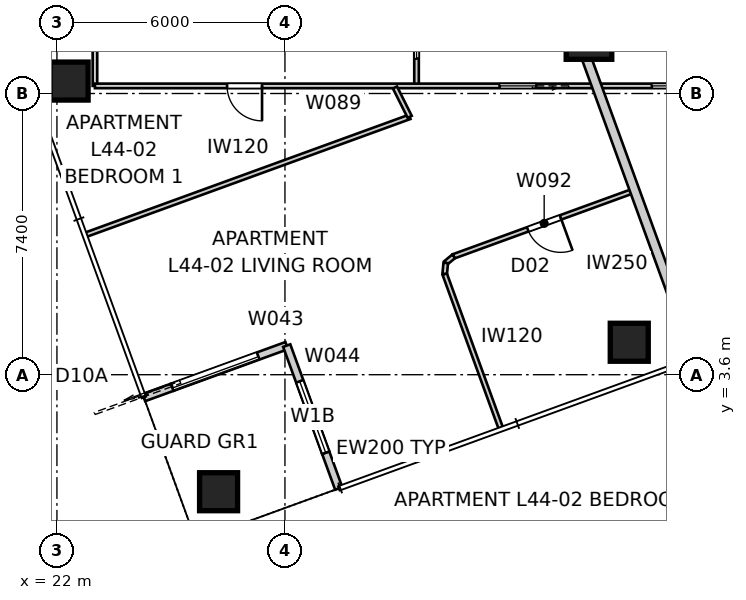
"""IFC4 building model, lengths in metres.
Left out: names, types, materials, properties, quantities, classifications, styles, units other than length and angle.
Written with IfcOpenShell. Run it as: python <this file> out.ifc"""

import sys

from ifc_helpers import new_model, si_unit, direction, frame, frame_2d, origin, origin_2d, place, context, subcontext, project, spatial, rectangle, extrude, element, fill, save


model = new_model("IFC4")
c1 = context("Model", 3, precision=1e-05, world=origin(), true_north=direction((0.0, 1.0)))
c2 = subcontext(c1, "Body", "Model", "MODEL_VIEW")
j1 = project(units=[si_unit("LENGTHUNIT", "METRE"), si_unit("PLANEANGLEUNIT", "RADIAN")], contexts=[c1])
p1 = place(None, origin())
s1 = spatial("IfcSite", under=j1, at=p1, CompositionType="ELEMENT")
p2 = place(p1, origin())
s2 = spatial("IfcBuilding", under=s1, at=p2, CompositionType="ELEMENT")
p3 = place(p2, frame((0.0, 0.0, 160.8)))
s3 = spatial("IfcBuildingStorey", under=s2, at=p3, CompositionType="ELEMENT", Elevation=160.8)
for number, where, z_axis, x_axis in (
    (1, (26.253, 0.521, 0.0), (0.0, 0.0, 1.0), (1.0, 0.0, 0.0)),
    (2, (37.06, 4.454, 0.0), (0.0, 0.0, 1.0), (1.0, 0.0, 0.0)),
    (3, (22.32, 11.327, 0.0), (0.0, 0.0, 1.0), (1.0, 0.0, 0.0)),
):
    element("IfcColumn", number, at=place(p3, frame(where, z_axis=z_axis, x_axis=x_axis)), inside=s3, PredefinedType="COLUMN", context=c2, shape_type="SweptSolid", body=[
        extrude(rectangle(XDim=1.0, YDim=1.0, at=origin_2d()), origin(), (0.0, 0.0, 1.0), 3.4),
    ])
p4 = place(p3, frame((36.0, 12.5, 0.0), z_axis=(0.0, 0.0, 1.0), x_axis=(1.0, 0.0, 0.0)))
e4 = element("IfcColumn", 4, at=p4, inside=s3, PredefinedType="COLUMN", context=c2, shape_type="SweptSolid", body=[
    extrude(rectangle(XDim=1.2, YDim=1.2, at=origin_2d()), origin(), (0.0, 0.0, 1.0), 3.4),
])
p5 = place(p3, frame((24.288, 2.998, 0.0), z_axis=(0.0, 0.0, 1.0), x_axis=(0.939659694648, 0.342110593602, 0.0)))
e5 = element("IfcWall", 5, at=p5, inside=s3, PredefinedType="SOLIDWALL", context=c2, shape_type="SweptSolid", body=[
    extrude(rectangle(XDim=0.8, YDim=0.2, at=frame_2d((0.4, 0.0))), origin(), (0.0, 0.0, 1.0), 3.25),
])
p6 = place(p3, frame((25.04, 3.271, 0.0), z_axis=(0.0, 0.0, 1.0), x_axis=(0.939693144909, 0.342018703306, 0.0)))
e6 = element("IfcWall", 6, at=p6, inside=s3, PredefinedType="SOLIDWALL", context=c2, shape_type="SweptSolid", body=[
    extrude(rectangle(XDim=3.2, YDim=0.2, at=frame_2d((1.6, 0.0))), origin(), (0.0, 0.0, 1.0), 2.722),
])
p7 = place(p6, origin())
e7 = element("IfcOpeningElement", 7, at=p7, cuts=e6, PredefinedType="OPENING", context=c2, shape_type="SweptSolid", body=[
    extrude(rectangle(XDim=2.4, YDim=2.1, at=frame_2d((1.2, 1.05))), frame((0.0, 0.11, 0.0), z_axis=(0.0, -1.0, 0.0), x_axis=(1.0, 0.0, 0.0)), (0.0, 0.0, 1.0), 0.22),
])
p8 = place(p3, frame((28.047, 4.366, 0.0), z_axis=(0.0, 0.0, 1.0), x_axis=(0.341965219194, -0.939712609717, 0.0)))
e8 = element("IfcWall", 8, at=p8, inside=s3, PredefinedType="SOLIDWALL", context=c2, shape_type="SweptSolid", body=[
    extrude(rectangle(XDim=3.0, YDim=0.2, at=frame_2d((1.5, 0.0))), origin(), (0.0, 0.0, 1.0), 2.722),
])
p9 = place(p8, frame((1.0, 0.0, 0.45)))
e9 = element("IfcOpeningElement", 9, at=p9, cuts=e8, PredefinedType="OPENING", context=c2, shape_type="SweptSolid", body=[
    extrude(rectangle(XDim=2.0, YDim=1.8, at=frame_2d((1.0, 0.9))), frame((0.0, 0.11, 0.0), z_axis=(0.0, -1.0, 0.0), x_axis=(1.0, 0.0, 0.0)), (0.0, 0.0, 1.0), 0.22),
])
p10 = place(p3, frame((29.073, 1.547, 0.0), z_axis=(0.0, 0.0, 1.0), x_axis=(0.342037080957, -0.939686455819, 0.0)))
e10 = element("IfcWall", 10, at=p10, inside=s3, PredefinedType="SOLIDWALL", context=c2, shape_type="SweptSolid", body=[
    extrude(rectangle(XDim=1.0, YDim=0.2, at=frame_2d((0.5, 0.0))), origin(), (0.0, 0.0, 1.0), 3.25),
])
p11 = place(p3, frame((38.812, 4.027, 0.0), z_axis=(0.0, 0.0, 1.0), x_axis=(-0.342027987857, 0.939689765573, 0.0)))
e11 = element("IfcWall", 11, at=p11, inside=s3, PredefinedType="PARTITIONING", context=c2, shape_type="SweptSolid", body=[
    extrude(rectangle(XDim=10.182, YDim=0.25, at=frame_2d((5.091, 0.0))), origin(), (0.0, 0.0, 1.0), 3.25),
])
p12 = place(p3, frame((23.0, 11.2, 0.0), z_axis=(0.0, 0.0, 1.0), x_axis=(0.0, 1.0, 0.0)))
e12 = element("IfcWall", 12, at=p12, inside=s3, PredefinedType="PARTITIONING", context=c2, shape_type="SweptSolid", body=[
    extrude(rectangle(XDim=8.1, YDim=0.12, at=frame_2d((4.05, 0.0))), origin(), (0.0, 0.0, 1.0), 3.25),
])
p13 = place(p12, frame((3.849, 0.0, 0.0)))
e13 = element("IfcOpeningElement", 13, at=p13, cuts=e12, PredefinedType="OPENING", context=c2, shape_type="SweptSolid", body=[
    extrude(rectangle(XDim=0.96, YDim=2.1, at=frame_2d((0.48, 1.05))), frame((0.0, 0.07, 0.0), z_axis=(0.0, -1.0, 0.0), x_axis=(1.0, 0.0, 0.0)), (0.0, 0.0, 1.0), 0.14),
])
p14 = place(p3, frame((31.462, 13.6, 0.0), z_axis=(0.0, 0.0, 1.0), x_axis=(0.0, -1.0, 0.0)))
e14 = element("IfcWall", 14, at=p14, inside=s3, PredefinedType="PARTITIONING", context=c2, shape_type="SweptSolid", body=[
    extrude(rectangle(XDim=2.4, YDim=0.12, at=frame_2d((1.2, 0.0))), origin(), (0.0, 0.0, 1.0), 3.25),
])
p15 = place(p14, frame((0.72, 0.0, 0.0)))
e15 = element("IfcOpeningElement", 15, at=p15, cuts=e14, PredefinedType="OPENING", context=c2, shape_type="SweptSolid", body=[
    extrude(rectangle(XDim=0.96, YDim=2.1, at=frame_2d((0.48, 1.05))), frame((0.0, 0.07, 0.0), z_axis=(0.0, -1.0, 0.0), x_axis=(1.0, 0.0, 0.0)), (0.0, 0.0, 1.0), 0.14),
])
p16 = place(p3, frame((43.098, 11.2, 0.0), z_axis=(0.0, 0.0, 1.0), x_axis=(-1.0, 0.0, 0.0)))
e16 = element("IfcWall", 16, at=p16, inside=s3, PredefinedType="PARTITIONING", context=c2, shape_type="SweptSolid", body=[
    extrude(rectangle(XDim=20.098, YDim=0.12, at=frame_2d((10.049, 0.0))), origin(), (0.0, 0.0, 1.0), 3.25),
])
p17 = place(p16, frame((15.701, 0.0, 0.0)))
e17 = element("IfcOpeningElement", 17, at=p17, cuts=e16, PredefinedType="OPENING", context=c2, shape_type="SweptSolid", body=[
    extrude(rectangle(XDim=0.92, YDim=2.34, at=frame_2d((0.46, 1.17))), frame((0.0, 0.07, 0.0), z_axis=(0.0, -1.0, 0.0), x_axis=(1.0, 0.0, 0.0)), (0.0, 0.0, 1.0), 0.14),
])
p18 = place(p16, frame((8.49, 0.0, 0.0)))
e18 = element("IfcOpeningElement", 18, at=p18, cuts=e16, PredefinedType="OPENING", context=c2, shape_type="SweptSolid", body=[
    extrude(rectangle(XDim=0.96, YDim=2.1, at=frame_2d((0.48, 1.05))), frame((0.0, 0.07, 0.0), z_axis=(0.0, -1.0, 0.0), x_axis=(1.0, 0.0, 0.0)), (0.0, 0.0, 1.0), 0.14),
])
p19 = place(p16, frame((0.185, 0.0, 0.0)))
e19 = element("IfcOpeningElement", 19, at=p19, cuts=e16, PredefinedType="OPENING", context=c2, shape_type="SweptSolid", body=[
    extrude(rectangle(XDim=0.96, YDim=2.1, at=frame_2d((0.48, 1.05))), frame((0.0, 0.07, 0.0), z_axis=(0.0, -1.0, 0.0), x_axis=(1.0, 0.0, 0.0)), (0.0, 0.0, 1.0), 0.14),
])
p20 = place(p16, frame((4.484, 0.0, 0.0)))
e20 = element("IfcOpeningElement", 20, at=p20, cuts=e16, PredefinedType="OPENING", context=c2, shape_type="SweptSolid", body=[
    extrude(rectangle(XDim=0.96, YDim=2.1, at=frame_2d((0.48, 1.05))), frame((0.0, 0.07, 0.0), z_axis=(0.0, -1.0, 0.0), x_axis=(1.0, 0.0, 0.0)), (0.0, 0.0, 1.0), 0.14),
])
p21 = place(p3, frame((22.769, 7.287, 0.0), z_axis=(0.0, 0.0, 1.0), x_axis=(0.939692673089, 0.342019999623, 0.0)))
e21 = element("IfcWall", 21, at=p21, inside=s3, PredefinedType="PARTITIONING", context=c2, shape_type="SweptSolid", body=[
    extrude(rectangle(XDim=9.06, YDim=0.12, at=frame_2d((4.53, 0.0))), origin(), (0.0, 0.0, 1.0), 3.25),
])
p22 = place(p3, frame((31.283, 10.385, 0.0), z_axis=(0.0, 0.0, 1.0), x_axis=(-0.448117513314, 0.893974660861, 0.0)))
e22 = element("IfcWall", 22, at=p22, inside=s3, PredefinedType="PARTITIONING", context=c2, shape_type="SweptSolid", body=[
    extrude(rectangle(XDim=0.864, YDim=0.12, at=frame_2d((0.432, 0.0))), origin(), (0.0, 0.0, 1.0), 3.25),
])
p23 = place(p3, frame((37.202, 8.449, 0.0), z_axis=(0.0, 0.0, 1.0), x_axis=(-0.939692115443, -0.34202153174, 0.0)))
e23 = element("IfcWall", 23, at=p23, inside=s3, PredefinedType="PARTITIONING", context=c2, shape_type="SweptSolid", body=[
    extrude(rectangle(XDim=5.068, YDim=0.12, at=frame_2d((2.534, 0.0))), origin(), (0.0, 0.0, 1.0), 3.25),
])
p24 = place(p23, frame((2.074, 0.0, 0.0)))
e24 = element("IfcOpeningElement", 24, at=p24, cuts=e23, PredefinedType="OPENING", context=c2, shape_type="SweptSolid", body=[
    extrude(rectangle(XDim=0.92, YDim=2.34, at=frame_2d((0.46, 1.17))), frame((0.0, 0.07, 0.0), z_axis=(0.0, -1.0, 0.0), x_axis=(1.0, 0.0, 0.0)), (0.0, 0.0, 1.0), 0.14),
])
p25 = place(p3, frame((32.44, 6.715, 0.0), z_axis=(0.0, 0.0, 1.0), x_axis=(-0.769401529914, -0.638765438769, 0.0)))
e25 = element("IfcWall", 25, at=p25, inside=s3, PredefinedType="PARTITIONING", context=c2, shape_type="SweptSolid", body=[
    extrude(rectangle(XDim=0.271, YDim=0.12, at=frame_2d((0.135, 0.0))), origin(), (0.0, 0.0, 1.0), 3.25),
])
p26 = place(p3, frame((32.231, 6.542, 0.0), z_axis=(0.0, 0.0, 1.0), x_axis=(-0.093212941297, -0.995646195983, 0.0)))
e26 = element("IfcWall", 26, at=p26, inside=s3, PredefinedType="PARTITIONING", context=c2, shape_type="SweptSolid", body=[
    extrude(rectangle(XDim=0.296, YDim=0.12, at=frame_2d((0.148, 0.0))), origin(), (0.0, 0.0, 1.0), 3.25),
])
p27 = place(p3, frame((32.204, 6.248, 0.0), z_axis=(0.0, 0.0, 1.0), x_axis=(0.342011603146, -0.939695729113, 0.0)))
e27 = element("IfcWall", 27, at=p27, inside=s3, PredefinedType="PARTITIONING", context=c2, shape_type="SweptSolid", body=[
    extrude(rectangle(XDim=4.307, YDim=0.12, at=frame_2d((2.153, 0.0))), origin(), (0.0, 0.0, 1.0), 3.25),
])
p28 = place(p7, origin())
e28 = element("IfcDoor", 28, at=p28, inside=s3, OperationType="SLIDING_TO_LEFT", PredefinedType="DOOR", context=c2, shape_type="SweptSolid", body=[
    extrude(rectangle(XDim=2.4, YDim=2.1, at=frame_2d((1.2, 1.05))), frame((0.0, 0.025, 0.0), z_axis=(0.0, -1.0, 0.0), x_axis=(1.0, 0.0, 0.0)), (0.0, 0.0, 1.0), 0.05),
])
fill(e7, e28)
p29 = place(p9, origin())
e29 = element("IfcWindow", 29, at=p29, inside=s3, PartitioningType="SINGLE_PANEL", PredefinedType="WINDOW", context=c2, shape_type="SweptSolid", body=[
    extrude(rectangle(XDim=2.0, YDim=1.8, at=frame_2d((1.0, 0.9))), frame((0.0, 0.03, 0.0), z_axis=(0.0, -1.0, 0.0), x_axis=(1.0, 0.0, 0.0)), (0.0, 0.0, 1.0), 0.06),
])
fill(e9, e29)
p30 = place(p17, origin())
e30 = element("IfcDoor", 30, at=p30, inside=s3, OperationType="SINGLE_SWING_LEFT", PredefinedType="DOOR", context=c2, shape_type="SweptSolid", body=[
    extrude(rectangle(XDim=0.92, YDim=2.34, at=frame_2d((0.46, 1.17))), frame((0.0, 0.025, 0.0), z_axis=(0.0, -1.0, 0.0), x_axis=(1.0, 0.0, 0.0)), (0.0, 0.0, 1.0), 0.05),
])
fill(e17, e30)
p31 = place(p15, origin())
e31 = element("IfcDoor", 31, at=p31, inside=s3, OperationType="SLIDING_TO_LEFT", PredefinedType="DOOR", context=c2, shape_type="SweptSolid", body=[
    extrude(rectangle(XDim=0.96, YDim=2.1, at=frame_2d((0.48, 1.05))), frame((0.0, 0.025, 0.0), z_axis=(0.0, -1.0, 0.0), x_axis=(1.0, 0.0, 0.0)), (0.0, 0.0, 1.0), 0.05),
])
fill(e15, e31)
p32 = place(p18, origin())
e32 = element("IfcDoor", 32, at=p32, inside=s3, OperationType="SLIDING_TO_LEFT", PredefinedType="DOOR", context=c2, shape_type="SweptSolid", body=[
    extrude(rectangle(XDim=0.96, YDim=2.1, at=frame_2d((0.48, 1.05))), frame((0.0, 0.025, 0.0), z_axis=(0.0, -1.0, 0.0), x_axis=(1.0, 0.0, 0.0)), (0.0, 0.0, 1.0), 0.05),
])
fill(e18, e32)
p33 = place(p24, origin())
e33 = element("IfcDoor", 33, at=p33, inside=s3, OperationType="SINGLE_SWING_LEFT", PredefinedType="DOOR", context=c2, shape_type="SweptSolid", body=[
    extrude(rectangle(XDim=0.92, YDim=2.34, at=frame_2d((0.46, 1.17))), frame((0.0, 0.025, 0.0), z_axis=(0.0, -1.0, 0.0), x_axis=(1.0, 0.0, 0.0)), (0.0, 0.0, 1.0), 0.05),
])
fill(e24, e33)
p34 = place(p20, origin())
e34 = element("IfcDoor", 34, at=p34, inside=s3, OperationType="SLIDING_TO_LEFT", PredefinedType="DOOR", context=c2, shape_type="SweptSolid", body=[
    extrude(rectangle(XDim=0.96, YDim=2.1, at=frame_2d((0.48, 1.05))), frame((0.0, 0.025, 0.0), z_axis=(0.0, -1.0, 0.0), x_axis=(1.0, 0.0, 0.0)), (0.0, 0.0, 1.0), 0.05),
])
fill(e20, e34)
save(model, sys.argv[1])
